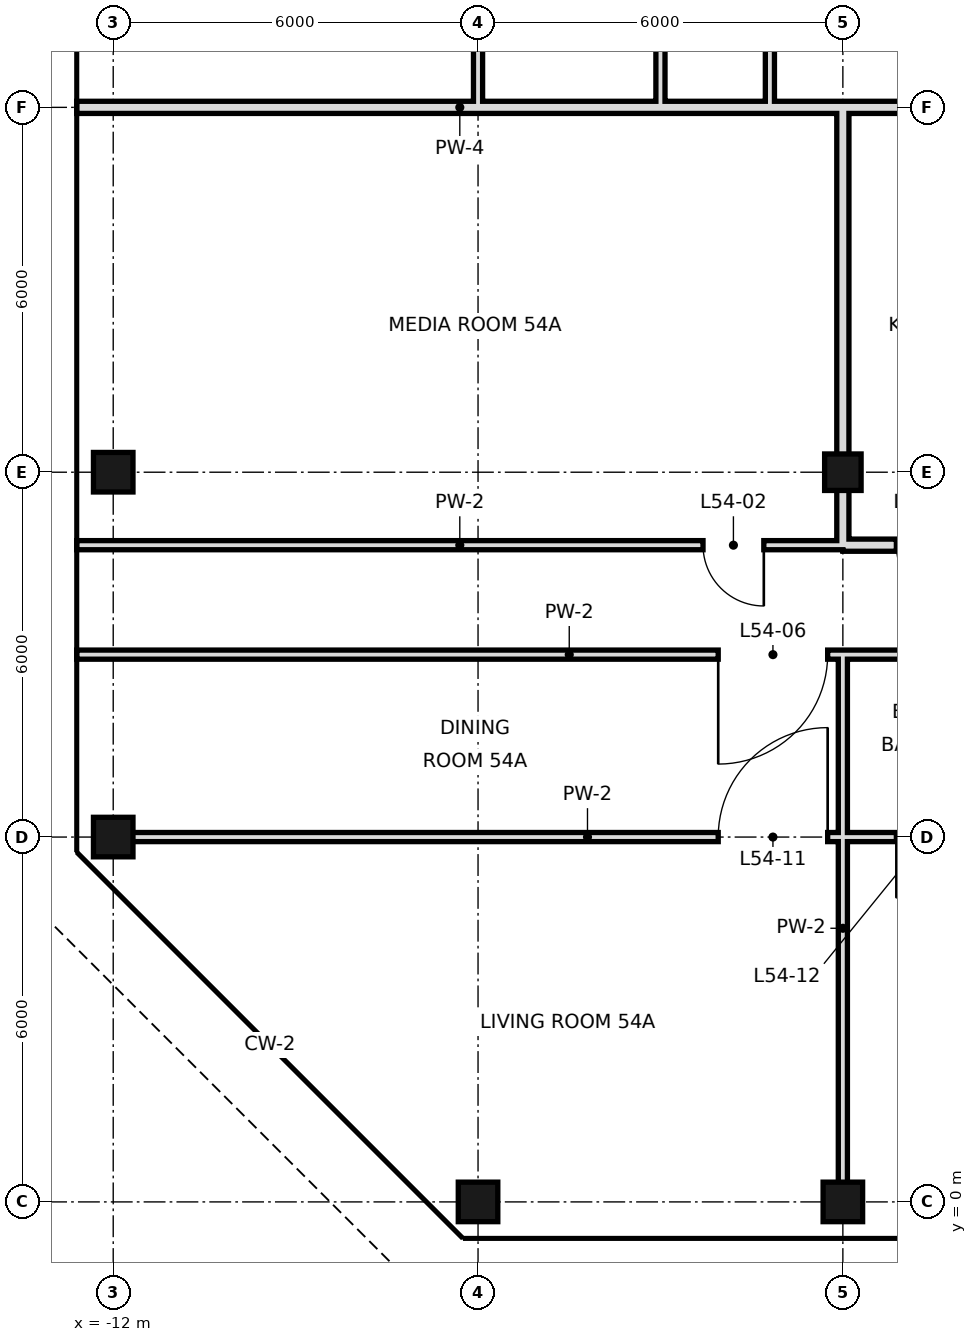
"""IFC4 building model, lengths in metres.
Left out: names, types, materials, properties, quantities, classifications, styles, units other than length and angle.
Written with IfcOpenShell. Run it as: python <this file> out.ifc"""

import sys

from ifc_helpers import new_model, si_unit, direction, frame, frame_2d, origin, origin_2d, place, context, subcontext, project, spatial, rectangle, hollow_rectangle, extrude, element, fill, save


model = new_model("IFC4")
c1 = context("Model", 3, precision=1e-05, world=origin(), true_north=direction((0.0, 1.0)))
c2 = subcontext(c1, "Body", "Model", "MODEL_VIEW")
j1 = project(units=[si_unit("LENGTHUNIT", "METRE"), si_unit("PLANEANGLEUNIT", "RADIAN")], contexts=[c1])
p1 = place(None, origin())
s1 = spatial("IfcSite", under=j1, at=p1, CompositionType="ELEMENT")
p2 = place(p1, origin())
s2 = spatial("IfcBuilding", under=s1, at=p2, CompositionType="ELEMENT")
p3 = place(p2, frame((0.0, 0.0, 229.8)))
s3 = spatial("IfcBuildingStorey", under=s2, at=p3, CompositionType="ELEMENT", Elevation=229.8)
for number, where, z_axis, x_axis in (
    (1, (-12.0, 6.0, 0.0), (0.0, 0.0, 1.0), (1.0, 0.0, 0.0)),
    (2, (-12.0, 12.0, 0.0), (0.0, 0.0, 1.0), (1.0, 0.0, 0.0)),
    (3, (-6.0, 0.0, 0.0), (0.0, 0.0, 1.0), (1.0, 0.0, 0.0)),
    (4, (0.0, 0.0, 0.0), (0.0, 0.0, 1.0), (1.0, 0.0, 0.0)),
):
    element("IfcColumn", number, at=place(p3, frame(where, z_axis=z_axis, x_axis=x_axis)), inside=s3, PredefinedType="COLUMN", context=c2, shape_type="SweptSolid", body=[
        extrude(hollow_rectangle(XDim=0.65, YDim=0.65, WallThickness=0.032, at=origin_2d()), origin(), (0.0, 0.0, 1.0), 4.4),
    ])
p4 = place(p3, frame((0.0, 12.0, 0.0), z_axis=(0.0, 0.0, 1.0), x_axis=(1.0, 0.0, 0.0)))
e5 = element("IfcColumn", 5, at=p4, inside=s3, PredefinedType="COLUMN", context=c2, shape_type="SweptSolid", body=[
    extrude(hollow_rectangle(XDim=0.6, YDim=0.6, WallThickness=0.028, at=origin_2d()), origin(), (0.0, 0.0, 1.0), 4.4),
])
p5 = place(p3, frame((-1.2, 18.0, 0.0), z_axis=(0.0, 0.0, 1.0), x_axis=(0.0, 1.0, 0.0)))
e6 = element("IfcWall", 6, at=p5, inside=s3, PredefinedType="PARTITIONING", context=c2, shape_type="SweptSolid", body=[
    extrude(rectangle(XDim=18.0, YDim=0.15, at=frame_2d((9.0, 0.0))), origin(), (0.0, 0.0, 1.0), 4.1),
])
p6 = place(p5, frame((14.5, 0.0, 0.0)))
e7 = element("IfcOpeningElement", 7, at=p6, cuts=e6, PredefinedType="OPENING", context=c2, shape_type="SweptSolid", body=[
    extrude(rectangle(XDim=1.0, YDim=2.4, at=frame_2d((0.5, 1.2))), frame((0.0, 0.085, 0.0), z_axis=(0.0, -1.0, 0.0), x_axis=(1.0, 0.0, 0.0)), (0.0, 0.0, 1.0), 0.17),
])
p7 = place(p5, frame((7.6, 0.0, 0.0)))
e8 = element("IfcOpeningElement", 8, at=p7, cuts=e6, PredefinedType="OPENING", context=c2, shape_type="SweptSolid", body=[
    extrude(rectangle(XDim=1.0, YDim=2.4, at=frame_2d((0.5, 1.2))), frame((0.0, 0.085, 0.0), z_axis=(0.0, -1.0, 0.0), x_axis=(1.0, 0.0, 0.0)), (0.0, 0.0, 1.0), 0.17),
])
p8 = place(p3, frame((-3.0, 18.0, 0.0), z_axis=(0.0, 0.0, 1.0), x_axis=(0.0, 1.0, 0.0)))
e9 = element("IfcWall", 9, at=p8, inside=s3, PredefinedType="PARTITIONING", context=c2, shape_type="SweptSolid", body=[
    extrude(rectangle(XDim=14.4, YDim=0.15, at=frame_2d((7.2, 0.0))), origin(), (0.0, 0.0, 1.0), 4.1),
])
p9 = place(p8, frame((7.04, 0.0, 0.0)))
e10 = element("IfcOpeningElement", 10, at=p9, cuts=e9, PredefinedType="OPENING", context=c2, shape_type="SweptSolid", body=[
    extrude(rectangle(XDim=1.8, YDim=2.4, at=frame_2d((0.9, 1.2))), frame((0.0, 0.085, 0.0), z_axis=(0.0, -1.0, 0.0), x_axis=(1.0, 0.0, 0.0)), (0.0, 0.0, 1.0), 0.17),
])
p10 = place(p8, frame((12.52, 0.0, 0.0)))
e11 = element("IfcOpeningElement", 11, at=p10, cuts=e9, PredefinedType="OPENING", context=c2, shape_type="SweptSolid", body=[
    extrude(rectangle(XDim=1.0, YDim=2.4, at=frame_2d((0.5, 1.2))), frame((0.0, 0.085, 0.0), z_axis=(0.0, -1.0, 0.0), x_axis=(1.0, 0.0, 0.0)), (0.0, 0.0, 1.0), 0.17),
])
p11 = place(p3, frame((-6.0, 18.0, 0.0), z_axis=(0.0, 0.0, 1.0), x_axis=(0.0, 1.0, 0.0)))
e12 = element("IfcWall", 12, at=p11, inside=s3, PredefinedType="PARTITIONING", context=c2, shape_type="SweptSolid", body=[
    extrude(rectangle(XDim=14.4, YDim=0.15, at=frame_2d((7.2, 0.0))), origin(), (0.0, 0.0, 1.0), 4.1),
])
p12 = place(p11, frame((3.16, 0.0, 0.0)))
e13 = element("IfcOpeningElement", 13, at=p12, cuts=e12, PredefinedType="OPENING", context=c2, shape_type="SweptSolid", body=[
    extrude(rectangle(XDim=1.8, YDim=2.4, at=frame_2d((0.9, 1.2))), frame((0.0, 0.085, 0.0), z_axis=(0.0, -1.0, 0.0), x_axis=(1.0, 0.0, 0.0)), (0.0, 0.0, 1.0), 0.17),
])
p13 = place(p11, frame((12.52, 0.0, 0.0)))
e14 = element("IfcOpeningElement", 14, at=p13, cuts=e12, PredefinedType="OPENING", context=c2, shape_type="SweptSolid", body=[
    extrude(rectangle(XDim=1.0, YDim=2.4, at=frame_2d((0.5, 1.2))), frame((0.0, 0.085, 0.0), z_axis=(0.0, -1.0, 0.0), x_axis=(1.0, 0.0, 0.0)), (0.0, 0.0, 1.0), 0.17),
])
p14 = place(p3, frame((0.0, 10.8, 0.0), z_axis=(0.0, 0.0, 1.0), x_axis=(0.0, 1.0, 0.0)))
e15 = element("IfcWall", 15, at=p14, inside=s3, PredefinedType="SOLIDWALL", context=c2, shape_type="SweptSolid", body=[
    extrude(rectangle(XDim=7.2, YDim=0.2, at=frame_2d((3.6, 0.0))), origin(), (0.0, 0.0, 1.0), 3.4),
])
p15 = place(p3, frame((0.0, 0.0, 0.0), z_axis=(0.0, 0.0, 1.0), x_axis=(0.0, 1.0, 0.0)))
e16 = element("IfcWall", 16, at=p15, inside=s3, PredefinedType="PARTITIONING", context=c2, shape_type="SweptSolid", body=[
    extrude(rectangle(XDim=9.0, YDim=0.15, at=frame_2d((4.5, 0.0))), origin(), (0.0, 0.0, 1.0), 3.4),
])
p16 = place(p3, frame((0.0, 10.8, 0.0), z_axis=(0.0, 0.0, 1.0), x_axis=(1.0, 0.0, 0.0)))
e17 = element("IfcWall", 17, at=p16, inside=s3, PredefinedType="SOLIDWALL", context=c2, shape_type="SweptSolid", body=[
    extrude(rectangle(XDim=3.6, YDim=0.2, at=frame_2d((1.8, 0.0))), origin(), (0.0, 0.0, 1.0), 3.4),
])
p17 = place(p16, frame((0.88, 0.0, 0.0)))
e18 = element("IfcOpeningElement", 18, at=p17, cuts=e17, PredefinedType="OPENING", context=c2, shape_type="SweptSolid", body=[
    extrude(rectangle(XDim=1.0, YDim=2.4, at=frame_2d((0.5, 1.2))), frame((0.0, 0.11, 0.0), z_axis=(0.0, -1.0, 0.0), x_axis=(1.0, 0.0, 0.0)), (0.0, 0.0, 1.0), 0.22),
])
p18 = place(p3, frame((-12.6, 10.8, 0.0), z_axis=(0.0, 0.0, 1.0), x_axis=(1.0, 0.0, 0.0)))
e19 = element("IfcWall", 19, at=p18, inside=s3, PredefinedType="PARTITIONING", context=c2, shape_type="SweptSolid", body=[
    extrude(rectangle(XDim=12.6, YDim=0.15, at=frame_2d((6.3, 0.0))), origin(), (0.0, 0.0, 1.0), 4.1),
])
p19 = place(p18, frame((10.3, 0.0, 0.0)))
e20 = element("IfcOpeningElement", 20, at=p19, cuts=e19, PredefinedType="OPENING", context=c2, shape_type="SweptSolid", body=[
    extrude(rectangle(XDim=1.0, YDim=2.4, at=frame_2d((0.5, 1.2))), frame((0.0, 0.085, 0.0), z_axis=(0.0, -1.0, 0.0), x_axis=(1.0, 0.0, 0.0)), (0.0, 0.0, 1.0), 0.17),
])
p20 = place(p3, frame((0.0, 18.0, 0.0), z_axis=(0.0, 0.0, 1.0), x_axis=(1.0, 0.0, 0.0)))
e21 = element("IfcWall", 21, at=p20, inside=s3, PredefinedType="SOLIDWALL", context=c2, shape_type="SweptSolid", body=[
    extrude(rectangle(XDim=3.1, YDim=0.2, at=frame_2d((1.55, 0.0))), origin(), (0.0, 0.0, 1.0), 3.4),
])
p21 = place(p3, frame((-12.6, 18.0, 0.0), z_axis=(0.0, 0.0, 1.0), x_axis=(1.0, 0.0, 0.0)))
e22 = element("IfcWall", 22, at=p21, inside=s3, PredefinedType="SOLIDWALL", context=c2, shape_type="SweptSolid", body=[
    extrude(rectangle(XDim=12.6, YDim=0.2, at=frame_2d((6.3, 0.0))), origin(), (0.0, 0.0, 1.0), 3.4),
])
p22 = place(p3, frame((-12.0, 6.0, 0.0), z_axis=(0.0, 0.0, 1.0), x_axis=(1.0, 0.0, 0.0)))
e23 = element("IfcWall", 23, at=p22, inside=s3, PredefinedType="PARTITIONING", context=c2, shape_type="SweptSolid", body=[
    extrude(rectangle(XDim=15.6, YDim=0.15, at=frame_2d((7.8, 0.0))), origin(), (0.0, 0.0, 1.0), 3.4),
])
p23 = place(p22, frame((9.95, 0.0, 0.0)))
e24 = element("IfcOpeningElement", 24, at=p23, cuts=e23, PredefinedType="OPENING", context=c2, shape_type="SweptSolid", body=[
    extrude(rectangle(XDim=1.8, YDim=2.4, at=frame_2d((0.9, 1.2))), frame((0.0, 0.085, 0.0), z_axis=(0.0, -1.0, 0.0), x_axis=(1.0, 0.0, 0.0)), (0.0, 0.0, 1.0), 0.17),
])
p24 = place(p22, frame((12.88, 0.0, 0.0)))
e25 = element("IfcOpeningElement", 25, at=p24, cuts=e23, PredefinedType="OPENING", context=c2, shape_type="SweptSolid", body=[
    extrude(rectangle(XDim=1.0, YDim=2.4, at=frame_2d((0.5, 1.2))), frame((0.0, 0.085, 0.0), z_axis=(0.0, -1.0, 0.0), x_axis=(1.0, 0.0, 0.0)), (0.0, 0.0, 1.0), 0.17),
])
p25 = place(p3, frame((-12.6, 9.0, 0.0), z_axis=(0.0, 0.0, 1.0), x_axis=(1.0, 0.0, 0.0)))
e26 = element("IfcWall", 26, at=p25, inside=s3, PredefinedType="PARTITIONING", context=c2, shape_type="SweptSolid", body=[
    extrude(rectangle(XDim=16.2, YDim=0.15, at=frame_2d((8.1, 0.0))), origin(), (0.0, 0.0, 1.0), 4.1),
])
p26 = place(p25, frame((10.55, 0.0, 0.0)))
e27 = element("IfcOpeningElement", 27, at=p26, cuts=e26, PredefinedType="OPENING", context=c2, shape_type="SweptSolid", body=[
    extrude(rectangle(XDim=1.8, YDim=2.4, at=frame_2d((0.9, 1.2))), frame((0.0, 0.085, 0.0), z_axis=(0.0, -1.0, 0.0), x_axis=(1.0, 0.0, 0.0)), (0.0, 0.0, 1.0), 0.17),
])
p27 = place(p25, frame((14.32, 0.0, 0.0)))
e28 = element("IfcOpeningElement", 28, at=p27, cuts=e26, PredefinedType="OPENING", context=c2, shape_type="SweptSolid", body=[
    extrude(rectangle(XDim=1.0, YDim=2.4, at=frame_2d((0.5, 1.2))), frame((0.0, 0.085, 0.0), z_axis=(0.0, -1.0, 0.0), x_axis=(1.0, 0.0, 0.0)), (0.0, 0.0, 1.0), 0.17),
])
p28 = place(p19, origin())
e29 = element("IfcDoor", 29, at=p28, inside=s3, OperationType="SINGLE_SWING_RIGHT", PredefinedType="DOOR", context=c2, shape_type="SweptSolid", body=[
    extrude(rectangle(XDim=1.0, YDim=2.4, at=frame_2d((0.5, 1.2))), frame((0.0, 0.025, 0.0), z_axis=(0.0, -1.0, 0.0), x_axis=(1.0, 0.0, 0.0)), (0.0, 0.0, 1.0), 0.05),
])
fill(e20, e29)
p29 = place(p17, origin())
e30 = element("IfcDoor", 30, at=p29, inside=s3, OperationType="SINGLE_SWING_RIGHT", PredefinedType="DOOR", context=c2, shape_type="SweptSolid", body=[
    extrude(rectangle(XDim=1.0, YDim=2.4, at=frame_2d((0.5, 1.2))), frame((0.0, 0.025, 0.0), z_axis=(0.0, -1.0, 0.0), x_axis=(1.0, 0.0, 0.0)), (0.0, 0.0, 1.0), 0.05),
])
fill(e18, e30)
p30 = place(p26, frame((1.8, 0.0, 0.0), z_axis=(0.0, 0.0, 1.0), x_axis=(-1.0, 0.0, 0.0)))
e31 = element("IfcDoor", 31, at=p30, inside=s3, OperationType="SINGLE_SWING_RIGHT", PredefinedType="DOOR", context=c2, shape_type="SweptSolid", body=[
    extrude(rectangle(XDim=1.8, YDim=2.4, at=frame_2d((0.9, 1.2))), frame((0.0, 0.025, 0.0), z_axis=(0.0, -1.0, 0.0), x_axis=(1.0, 0.0, 0.0)), (0.0, 0.0, 1.0), 0.05),
])
fill(e27, e31)
p31 = place(p23, frame((1.8, 0.0, 0.0), z_axis=(0.0, 0.0, 1.0), x_axis=(-1.0, 0.0, 0.0)))
e32 = element("IfcDoor", 32, at=p31, inside=s3, OperationType="SINGLE_SWING_LEFT", PredefinedType="DOOR", context=c2, shape_type="SweptSolid", body=[
    extrude(rectangle(XDim=1.8, YDim=2.4, at=frame_2d((0.9, 1.2))), frame((0.0, 0.025, 0.0), z_axis=(0.0, -1.0, 0.0), x_axis=(1.0, 0.0, 0.0)), (0.0, 0.0, 1.0), 0.05),
])
fill(e24, e32)
p32 = place(p24, frame((1.0, 0.0, 0.0), z_axis=(0.0, 0.0, 1.0), x_axis=(-1.0, 0.0, 0.0)))
e33 = element("IfcDoor", 33, at=p32, inside=s3, OperationType="SINGLE_SWING_RIGHT", PredefinedType="DOOR", context=c2, shape_type="SweptSolid", body=[
    extrude(rectangle(XDim=1.0, YDim=2.4, at=frame_2d((0.5, 1.2))), frame((0.0, 0.025, 0.0), z_axis=(0.0, -1.0, 0.0), x_axis=(1.0, 0.0, 0.0)), (0.0, 0.0, 1.0), 0.05),
])
fill(e25, e33)
save(model, sys.argv[1])
